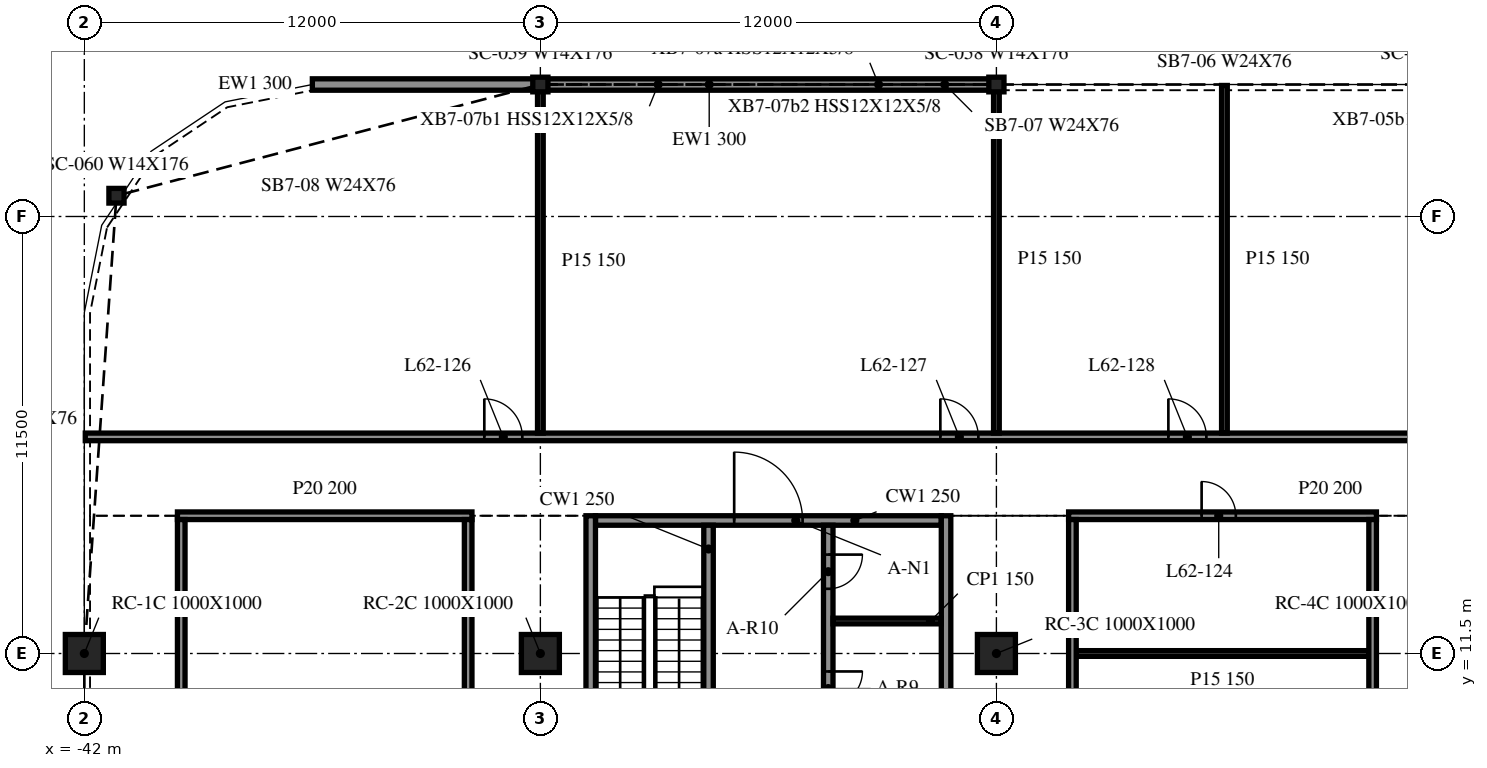
"""IFC4 building model, lengths in metres.
Left out: names, types, materials, properties, quantities, classifications, styles, units other than length and angle.
Written with IfcOpenShell. Run it as: python <this file> out.ifc"""

import sys

from ifc_helpers import new_model, si_unit, direction, frame, frame_2d, origin, origin_2d, place, context, subcontext, project, spatial, rectangle, i_section, extrude, element, fill, save


model = new_model("IFC4")
c1 = context("Model", 3, precision=1e-05, world=origin(), true_north=direction((0.0, 1.0)))
c2 = subcontext(c1, "Body", "Model", "MODEL_VIEW")
j1 = project(units=[si_unit("LENGTHUNIT", "METRE"), si_unit("PLANEANGLEUNIT", "RADIAN")], contexts=[c1])
p1 = place(None, origin())
s1 = spatial("IfcSite", under=j1, at=p1, CompositionType="ELEMENT")
p2 = place(p1, origin())
s2 = spatial("IfcBuilding", under=s1, at=p2, CompositionType="ELEMENT")
p3 = place(p2, frame((0.0, 0.0, 255.2)))
s3 = spatial("IfcBuildingStorey", under=s2, at=p3, CompositionType="ELEMENT", Elevation=255.2)
for number, where, z_axis, x_axis in (
    (1, (-42.0, 11.5, -0.34), (0.0, 0.0, 1.0), (1.0, 0.0, 0.0)),
    (2, (-30.0, 11.5, -0.34), (0.0, 0.0, 1.0), (1.0, 0.0, 0.0)),
    (3, (-18.0, 11.5, -0.34), (0.0, 0.0, 1.0), (1.0, 0.0, 0.0)),
):
    element("IfcColumn", number, at=place(p3, frame(where, z_axis=z_axis, x_axis=x_axis)), inside=s3, PredefinedType="COLUMN", context=c2, shape_type="SweptSolid", body=[
        extrude(rectangle(XDim=1.0, YDim=1.0, at=origin_2d()), origin(), (0.0, 0.0, 1.0), 3.74),
    ])
for number, where, z_axis, x_axis in (
    (4, (-18.0, 26.473, -0.34), (0.0, 0.0, 1.0), (1.0, 0.0, 0.0)),
    (5, (-30.0, 26.473, -0.34), (0.0, 0.0, 1.0), (1.0, 0.0, 0.0)),
    (6, (-41.154, 23.546, -0.34), (0.0, 0.0, 1.0), (1.0, 0.0, 0.0)),
):
    element("IfcColumn", number, at=place(p3, frame(where, z_axis=z_axis, x_axis=x_axis)), inside=s3, PredefinedType="COLUMN", context=c2, shape_type="SweptSolid", body=[
        extrude(i_section(OverallWidth=0.399, OverallDepth=0.386, WebThickness=0.021, FlangeThickness=0.033, at=origin_2d()), origin(), (0.0, 0.0, 1.0), 3.74),
    ])
p4 = place(p3, frame((-18.01, 26.473, 0.0), z_axis=(0.0, 0.0, 1.0), x_axis=(-1.0, 0.0, 0.0)))
e7 = element("IfcWall", 7, at=p4, inside=s3, PredefinedType="NOTDEFINED", context=c2, shape_type="SweptSolid", body=[
    extrude(rectangle(XDim=11.979, YDim=0.3, at=frame_2d((5.99, 0.0))), origin(), (0.0, 0.0, 1.0), 3.4),
])
p5 = place(p3, frame((-30.01, 26.473, 0.0), z_axis=(0.0, 0.0, 1.0), x_axis=(-1.0, 0.0, 0.0)))
e8 = element("IfcWall", 8, at=p5, inside=s3, PredefinedType="NOTDEFINED", context=c2, shape_type="SweptSolid", body=[
    extrude(rectangle(XDim=5.99, YDim=0.3, at=frame_2d((2.995, 0.0))), origin(), (0.0, 0.0, 1.0), 3.4),
])
for number, where, z_axis, x_axis in (
    (9, (-28.675, 15.125, 0.0), (0.0, 0.0, 1.0), (0.0, -1.0, 0.0)),
    (10, (-19.325, -9.125, 0.0), (0.0, 0.0, 1.0), (0.0, 1.0, 0.0)),
):
    element("IfcWall", number, at=place(p3, frame(where, z_axis=z_axis, x_axis=x_axis)), inside=s3, PredefinedType="SOLIDWALL", context=c2, shape_type="SweptSolid", body=[
        extrude(rectangle(XDim=24.25, YDim=0.25, at=frame_2d((12.125, 0.0))), origin(), (0.0, 0.0, 1.0), 3.4),
    ])
p6 = place(p3, frame((-28.55, 15.0, 0.0), z_axis=(0.0, 0.0, 1.0), x_axis=(1.0, 0.0, 0.0)))
e11 = element("IfcWall", 11, at=p6, inside=s3, PredefinedType="SOLIDWALL", context=c2, shape_type="SweptSolid", body=[
    extrude(rectangle(XDim=9.1, YDim=0.25, at=frame_2d((4.55, 0.0))), origin(), (0.0, 0.0, 1.0), 3.4),
])
p7 = place(p6, frame((3.65, 0.0, 0.0)))
e12 = element("IfcOpeningElement", 12, at=p7, cuts=e11, PredefinedType="OPENING", context=c2, shape_type="SweptSolid", body=[
    extrude(rectangle(XDim=1.8, YDim=2.1, at=frame_2d((0.9, 1.05))), frame((0.0, 0.135, 0.0), z_axis=(0.0, -1.0, 0.0), x_axis=(1.0, 0.0, 0.0)), (0.0, 0.0, 1.0), 0.27),
])
p8 = place(p3, frame((-25.575, 14.875, 0.0), z_axis=(0.0, 0.0, 1.0), x_axis=(0.0, -1.0, 0.0)))
e13 = element("IfcWall", 13, at=p8, inside=s3, PredefinedType="SOLIDWALL", context=c2, shape_type="SweptSolid", body=[
    extrude(rectangle(XDim=6.25, YDim=0.25, at=frame_2d((3.125, 0.0))), origin(), (0.0, 0.0, 1.0), 3.4),
])
p9 = place(p8, frame((4.85, 0.0, 0.0)))
e14 = element("IfcOpeningElement", 14, at=p9, cuts=e13, PredefinedType="OPENING", context=c2, shape_type="SweptSolid", body=[
    extrude(rectangle(XDim=1.0, YDim=2.1, at=frame_2d((0.5, 1.05))), frame((0.0, 0.135, 0.0), z_axis=(0.0, -1.0, 0.0), x_axis=(1.0, 0.0, 0.0)), (0.0, 0.0, 1.0), 0.27),
])
p10 = place(p3, frame((-22.425, 14.875, 0.0), z_axis=(0.0, 0.0, 1.0), x_axis=(0.0, -1.0, 0.0)))
e15 = element("IfcWall", 15, at=p10, inside=s3, PredefinedType="SOLIDWALL", context=c2, shape_type="SweptSolid", body=[
    extrude(rectangle(XDim=23.75, YDim=0.25, at=frame_2d((11.875, 0.0))), origin(), (0.0, 0.0, 1.0), 3.4),
])
p11 = place(p10, frame((15.225, 0.0, 0.0)))
e16 = element("IfcOpeningElement", 16, at=p11, cuts=e15, PredefinedType="OPENING", context=c2, shape_type="SweptSolid", body=[
    extrude(rectangle(XDim=0.9, YDim=2.1, at=frame_2d((0.45, 1.05))), frame((0.0, 0.135, 0.0), z_axis=(0.0, -1.0, 0.0), x_axis=(1.0, 0.0, 0.0)), (0.0, 0.0, 1.0), 0.27),
])
p12 = place(p10, frame((11.425, 0.0, 0.0)))
e17 = element("IfcOpeningElement", 17, at=p12, cuts=e15, PredefinedType="OPENING", context=c2, shape_type="SweptSolid", body=[
    extrude(rectangle(XDim=0.9, YDim=2.1, at=frame_2d((0.45, 1.05))), frame((0.0, 0.135, 0.0), z_axis=(0.0, -1.0, 0.0), x_axis=(1.0, 0.0, 0.0)), (0.0, 0.0, 1.0), 0.27),
])
p13 = place(p10, frame((7.625, 0.0, 0.0)))
e18 = element("IfcOpeningElement", 18, at=p13, cuts=e15, PredefinedType="OPENING", context=c2, shape_type="SweptSolid", body=[
    extrude(rectangle(XDim=0.9, YDim=2.1, at=frame_2d((0.45, 1.05))), frame((0.0, 0.135, 0.0), z_axis=(0.0, -1.0, 0.0), x_axis=(1.0, 0.0, 0.0)), (0.0, 0.0, 1.0), 0.27),
])
p14 = place(p10, frame((20.3, 0.0, 0.0)))
e19 = element("IfcOpeningElement", 19, at=p14, cuts=e15, PredefinedType="OPENING", context=c2, shape_type="SweptSolid", body=[
    extrude(rectangle(XDim=0.9, YDim=2.1, at=frame_2d((0.45, 1.05))), frame((0.0, 0.135, 0.0), z_axis=(0.0, -1.0, 0.0), x_axis=(1.0, 0.0, 0.0)), (0.0, 0.0, 1.0), 0.27),
])
p15 = place(p10, frame((3.847, 0.0, 0.0)))
e20 = element("IfcOpeningElement", 20, at=p15, cuts=e15, PredefinedType="OPENING", context=c2, shape_type="SweptSolid", body=[
    extrude(rectangle(XDim=0.9, YDim=2.1, at=frame_2d((0.45, 1.05))), frame((0.0, 0.135, 0.0), z_axis=(0.0, -1.0, 0.0), x_axis=(1.0, 0.0, 0.0)), (0.0, 0.0, 1.0), 0.27),
])
p16 = place(p10, frame((0.772, 0.0, 0.0)))
e21 = element("IfcOpeningElement", 21, at=p16, cuts=e15, PredefinedType="OPENING", context=c2, shape_type="SweptSolid", body=[
    extrude(rectangle(XDim=0.9, YDim=2.1, at=frame_2d((0.45, 1.05))), frame((0.0, 0.135, 0.0), z_axis=(0.0, -1.0, 0.0), x_axis=(1.0, 0.0, 0.0)), (0.0, 0.0, 1.0), 0.27),
])
p17 = place(p3, frame((-22.3, 12.355, 0.0), z_axis=(0.0, 0.0, 1.0), x_axis=(1.0, 0.0, 0.0)))
e22 = element("IfcWall", 22, at=p17, inside=s3, PredefinedType="PARTITIONING", context=c2, shape_type="SweptSolid", body=[
    extrude(rectangle(XDim=2.85, YDim=0.15, at=frame_2d((1.425, 0.0))), origin(), (0.0, 0.0, 1.0), 3.4),
])
p18 = place(p3, frame((-15.9, 11.5, 0.0), z_axis=(0.0, 0.0, 1.0), x_axis=(1.0, 0.0, 0.0)))
e23 = element("IfcWall", 23, at=p18, inside=s3, PredefinedType="PARTITIONING", context=c2, shape_type="SweptSolid", body=[
    extrude(rectangle(XDim=7.7, YDim=0.15, at=frame_2d((3.85, 0.0))), origin(), (0.0, 0.0, 1.0), 3.4),
])
p19 = place(p3, frame((-39.55, 15.125, 0.0), z_axis=(0.0, 0.0, 1.0), x_axis=(1.0, 0.0, 0.0)))
e24 = element("IfcWall", 24, at=p19, inside=s3, PredefinedType="PARTITIONING", context=c2, shape_type="SweptSolid", body=[
    extrude(rectangle(XDim=7.75, YDim=0.2, at=frame_2d((3.875, 0.0))), origin(), (0.0, 0.0, 1.0), 3.4),
])
p20 = place(p3, frame((-16.1, 15.125, 0.0), z_axis=(0.0, 0.0, 1.0), x_axis=(1.0, 0.0, 0.0)))
e25 = element("IfcWall", 25, at=p20, inside=s3, PredefinedType="PARTITIONING", context=c2, shape_type="SweptSolid", body=[
    extrude(rectangle(XDim=8.1, YDim=0.2, at=frame_2d((4.05, 0.0))), origin(), (0.0, 0.0, 1.0), 3.4),
])
p21 = place(p20, frame((3.5, 0.0, 0.0)))
e26 = element("IfcOpeningElement", 26, at=p21, cuts=e25, PredefinedType="OPENING", context=c2, shape_type="SweptSolid", body=[
    extrude(rectangle(XDim=0.9, YDim=2.1, at=frame_2d((0.45, 1.05))), frame((0.0, 0.11, 0.0), z_axis=(0.0, -1.0, 0.0), x_axis=(1.0, 0.0, 0.0)), (0.0, 0.0, 1.0), 0.22),
])
p22 = place(p3, frame((-41.975, 17.2, 0.0), z_axis=(0.0, 0.0, 1.0), x_axis=(1.0, 0.0, 0.0)))
e27 = element("IfcWall", 27, at=p22, inside=s3, PredefinedType="PARTITIONING", context=c2, shape_type="SweptSolid", body=[
    extrude(rectangle(XDim=95.95, YDim=0.2, at=frame_2d((47.975, 0.0))), origin(), (0.0, 0.0, 1.0), 3.4),
])
p23 = place(p22, frame((10.5, 0.0, 0.0)))
e28 = element("IfcOpeningElement", 28, at=p23, cuts=e27, PredefinedType="OPENING", context=c2, shape_type="SweptSolid", body=[
    extrude(rectangle(XDim=1.0, YDim=2.1, at=frame_2d((0.5, 1.05))), frame((0.0, 0.11, 0.0), z_axis=(0.0, -1.0, 0.0), x_axis=(1.0, 0.0, 0.0)), (0.0, 0.0, 1.0), 0.22),
])
p24 = place(p22, frame((22.5, 0.0, 0.0)))
e29 = element("IfcOpeningElement", 29, at=p24, cuts=e27, PredefinedType="OPENING", context=c2, shape_type="SweptSolid", body=[
    extrude(rectangle(XDim=1.0, YDim=2.1, at=frame_2d((0.5, 1.05))), frame((0.0, 0.11, 0.0), z_axis=(0.0, -1.0, 0.0), x_axis=(1.0, 0.0, 0.0)), (0.0, 0.0, 1.0), 0.22),
])
p25 = place(p22, frame((28.5, 0.0, 0.0)))
e30 = element("IfcOpeningElement", 30, at=p25, cuts=e27, PredefinedType="OPENING", context=c2, shape_type="SweptSolid", body=[
    extrude(rectangle(XDim=1.0, YDim=2.1, at=frame_2d((0.5, 1.05))), frame((0.0, 0.11, 0.0), z_axis=(0.0, -1.0, 0.0), x_axis=(1.0, 0.0, 0.0)), (0.0, 0.0, 1.0), 0.22),
])
p26 = place(p22, frame((40.7, 0.0, 0.0)))
e31 = element("IfcOpeningElement", 31, at=p26, cuts=e27, PredefinedType="OPENING", context=c2, shape_type="SweptSolid", body=[
    extrude(rectangle(XDim=0.9, YDim=2.1, at=frame_2d((0.45, 1.05))), frame((0.0, 0.11, 0.0), z_axis=(0.0, -1.0, 0.0), x_axis=(1.0, 0.0, 0.0)), (0.0, 0.0, 1.0), 0.22),
])
p27 = place(p22, frame((47.3, 0.0, 0.0)))
e32 = element("IfcOpeningElement", 32, at=p27, cuts=e27, PredefinedType="OPENING", context=c2, shape_type="SweptSolid", body=[
    extrude(rectangle(XDim=1.0, YDim=2.1, at=frame_2d((0.5, 1.05))), frame((0.0, 0.11, 0.0), z_axis=(0.0, -1.0, 0.0), x_axis=(1.0, 0.0, 0.0)), (0.0, 0.0, 1.0), 0.22),
])
p28 = place(p22, frame((54.1, 0.0, 0.0)))
e33 = element("IfcOpeningElement", 33, at=p28, cuts=e27, PredefinedType="OPENING", context=c2, shape_type="SweptSolid", body=[
    extrude(rectangle(XDim=0.9, YDim=2.1, at=frame_2d((0.45, 1.05))), frame((0.0, 0.11, 0.0), z_axis=(0.0, -1.0, 0.0), x_axis=(1.0, 0.0, 0.0)), (0.0, 0.0, 1.0), 0.22),
])
p29 = place(p22, frame((60.1, 0.0, 0.0)))
e34 = element("IfcOpeningElement", 34, at=p29, cuts=e27, PredefinedType="OPENING", context=c2, shape_type="SweptSolid", body=[
    extrude(rectangle(XDim=1.0, YDim=2.1, at=frame_2d((0.5, 1.05))), frame((0.0, 0.11, 0.0), z_axis=(0.0, -1.0, 0.0), x_axis=(1.0, 0.0, 0.0)), (0.0, 0.0, 1.0), 0.22),
])
p30 = place(p22, frame((72.1, 0.0, 0.0)))
e35 = element("IfcOpeningElement", 35, at=p30, cuts=e27, PredefinedType="OPENING", context=c2, shape_type="SweptSolid", body=[
    extrude(rectangle(XDim=1.0, YDim=2.1, at=frame_2d((0.5, 1.05))), frame((0.0, 0.11, 0.0), z_axis=(0.0, -1.0, 0.0), x_axis=(1.0, 0.0, 0.0)), (0.0, 0.0, 1.0), 0.22),
])
p31 = place(p22, frame((84.1, 0.0, 0.0)))
e36 = element("IfcOpeningElement", 36, at=p31, cuts=e27, PredefinedType="OPENING", context=c2, shape_type="SweptSolid", body=[
    extrude(rectangle(XDim=1.0, YDim=2.1, at=frame_2d((0.5, 1.05))), frame((0.0, 0.11, 0.0), z_axis=(0.0, -1.0, 0.0), x_axis=(1.0, 0.0, 0.0)), (0.0, 0.0, 1.0), 0.22),
])
p32 = place(p22, frame((90.1, 0.0, 0.0)))
e37 = element("IfcOpeningElement", 37, at=p32, cuts=e27, PredefinedType="OPENING", context=c2, shape_type="SweptSolid", body=[
    extrude(rectangle(XDim=0.9, YDim=2.1, at=frame_2d((0.45, 1.05))), frame((0.0, 0.11, 0.0), z_axis=(0.0, -1.0, 0.0), x_axis=(1.0, 0.0, 0.0)), (0.0, 0.0, 1.0), 0.22),
])
p33 = place(p3, frame((-39.45, -9.025, 0.0), z_axis=(0.0, 0.0, 1.0), x_axis=(0.0, 1.0, 0.0)))
e38 = element("IfcWall", 38, at=p33, inside=s3, PredefinedType="PARTITIONING", context=c2, shape_type="SweptSolid", body=[
    extrude(rectangle(XDim=24.05, YDim=0.2, at=frame_2d((12.025, 0.0))), origin(), (0.0, 0.0, 1.0), 3.4),
])
p34 = place(p33, frame((11.5, 0.0, 0.0)))
e39 = element("IfcOpeningElement", 39, at=p34, cuts=e38, PredefinedType="OPENING", context=c2, shape_type="SweptSolid", body=[
    extrude(rectangle(XDim=1.0, YDim=2.1, at=frame_2d((0.5, 1.05))), frame((0.0, 0.11, 0.0), z_axis=(0.0, -1.0, 0.0), x_axis=(1.0, 0.0, 0.0)), (0.0, 0.0, 1.0), 0.22),
])
p35 = place(p3, frame((-31.9, -9.025, 0.0), z_axis=(0.0, 0.0, 1.0), x_axis=(0.0, 1.0, 0.0)))
e40 = element("IfcWall", 40, at=p35, inside=s3, PredefinedType="PARTITIONING", context=c2, shape_type="SweptSolid", body=[
    extrude(rectangle(XDim=24.05, YDim=0.2, at=frame_2d((12.025, 0.0))), origin(), (0.0, 0.0, 1.0), 3.4),
])
p36 = place(p3, frame((-30.0, 17.3, 0.0), z_axis=(0.0, 0.0, 1.0), x_axis=(0.0, 1.0, 0.0)))
e41 = element("IfcWall", 41, at=p36, inside=s3, PredefinedType="PARTITIONING", context=c2, shape_type="SweptSolid", body=[
    extrude(rectangle(XDim=9.023, YDim=0.15, at=frame_2d((4.511, 0.0))), origin(), (0.0, 0.0, 1.0), 2.401),
])
p37 = place(p3, frame((-18.0, 17.3, 0.0), z_axis=(0.0, 0.0, 1.0), x_axis=(0.0, 1.0, 0.0)))
e42 = element("IfcWall", 42, at=p37, inside=s3, PredefinedType="PARTITIONING", context=c2, shape_type="SweptSolid", body=[
    extrude(rectangle(XDim=9.148, YDim=0.15, at=frame_2d((4.574, 0.0))), origin(), (0.0, 0.0, 1.0), 2.401),
])
p38 = place(p3, frame((-16.0, -9.025, 0.0), z_axis=(0.0, 0.0, 1.0), x_axis=(0.0, 1.0, 0.0)))
e43 = element("IfcWall", 43, at=p38, inside=s3, PredefinedType="PARTITIONING", context=c2, shape_type="SweptSolid", body=[
    extrude(rectangle(XDim=24.05, YDim=0.2, at=frame_2d((12.025, 0.0))), origin(), (0.0, 0.0, 1.0), 3.4),
])
p39 = place(p38, frame((11.5, 0.0, 0.0)))
e44 = element("IfcOpeningElement", 44, at=p39, cuts=e43, PredefinedType="OPENING", context=c2, shape_type="SweptSolid", body=[
    extrude(rectangle(XDim=0.9, YDim=2.1, at=frame_2d((0.45, 1.05))), frame((0.0, 0.11, 0.0), z_axis=(0.0, -1.0, 0.0), x_axis=(1.0, 0.0, 0.0)), (0.0, 0.0, 1.0), 0.22),
])
p40 = place(p3, frame((-12.0, 17.3, 0.0), z_axis=(0.0, 0.0, 1.0), x_axis=(0.0, 1.0, 0.0)))
e45 = element("IfcWall", 45, at=p40, inside=s3, PredefinedType="PARTITIONING", context=c2, shape_type="SweptSolid", body=[
    extrude(rectangle(XDim=9.148, YDim=0.15, at=frame_2d((4.574, 0.0))), origin(), (0.0, 0.0, 1.0), 3.4),
])
p41 = place(p3, frame((-8.1, -9.025, 0.0), z_axis=(0.0, 0.0, 1.0), x_axis=(0.0, 1.0, 0.0)))
e46 = element("IfcWall", 46, at=p41, inside=s3, PredefinedType="PARTITIONING", context=c2, shape_type="SweptSolid", body=[
    extrude(rectangle(XDim=24.05, YDim=0.2, at=frame_2d((12.025, 0.0))), origin(), (0.0, 0.0, 1.0), 3.4),
])
p42 = place(p7, origin())
e47 = element("IfcDoor", 47, at=p42, inside=s3, OperationType="DOUBLE_DOOR_SINGLE_SWING", PredefinedType="DOOR", context=c2, shape_type="SweptSolid", body=[
    extrude(rectangle(XDim=1.8, YDim=2.1, at=frame_2d((0.9, 1.05))), frame((0.0, 0.025, 0.0), z_axis=(0.0, -1.0, 0.0), x_axis=(1.0, 0.0, 0.0)), (0.0, 0.0, 1.0), 0.05),
])
fill(e12, e47)
p43 = place(p15, origin())
e48 = element("IfcDoor", 48, at=p43, inside=s3, OperationType="SINGLE_SWING_LEFT", PredefinedType="DOOR", context=c2, shape_type="SweptSolid", body=[
    extrude(rectangle(XDim=0.9, YDim=2.1, at=frame_2d((0.45, 1.05))), frame((0.0, 0.025, 0.0), z_axis=(0.0, -1.0, 0.0), x_axis=(1.0, 0.0, 0.0)), (0.0, 0.0, 1.0), 0.05),
])
fill(e20, e48)
p44 = place(p16, origin())
e49 = element("IfcDoor", 49, at=p44, inside=s3, OperationType="SINGLE_SWING_RIGHT", PredefinedType="DOOR", context=c2, shape_type="SweptSolid", body=[
    extrude(rectangle(XDim=0.9, YDim=2.1, at=frame_2d((0.45, 1.05))), frame((0.0, 0.025, 0.0), z_axis=(0.0, -1.0, 0.0), x_axis=(1.0, 0.0, 0.0)), (0.0, 0.0, 1.0), 0.05),
])
fill(e21, e49)
p45 = place(p21, origin())
e50 = element("IfcDoor", 50, at=p45, inside=s3, OperationType="SINGLE_SWING_RIGHT", PredefinedType="DOOR", context=c2, shape_type="SweptSolid", body=[
    extrude(rectangle(XDim=0.9, YDim=2.1, at=frame_2d((0.45, 1.05))), frame((0.0, 0.025, 0.0), z_axis=(0.0, -1.0, 0.0), x_axis=(1.0, 0.0, 0.0)), (0.0, 0.0, 1.0), 0.05),
])
fill(e26, e50)
p46 = place(p23, origin())
e51 = element("IfcDoor", 51, at=p46, inside=s3, OperationType="SINGLE_SWING_LEFT", PredefinedType="DOOR", context=c2, shape_type="SweptSolid", body=[
    extrude(rectangle(XDim=1.0, YDim=2.1, at=frame_2d((0.5, 1.05))), frame((0.0, 0.025, 0.0), z_axis=(0.0, -1.0, 0.0), x_axis=(1.0, 0.0, 0.0)), (0.0, 0.0, 1.0), 0.05),
])
fill(e28, e51)
p47 = place(p24, origin())
e52 = element("IfcDoor", 52, at=p47, inside=s3, OperationType="SINGLE_SWING_LEFT", PredefinedType="DOOR", context=c2, shape_type="SweptSolid", body=[
    extrude(rectangle(XDim=1.0, YDim=2.1, at=frame_2d((0.5, 1.05))), frame((0.0, 0.025, 0.0), z_axis=(0.0, -1.0, 0.0), x_axis=(1.0, 0.0, 0.0)), (0.0, 0.0, 1.0), 0.05),
])
fill(e29, e52)
p48 = place(p25, origin())
e53 = element("IfcDoor", 53, at=p48, inside=s3, OperationType="SINGLE_SWING_LEFT", PredefinedType="DOOR", context=c2, shape_type="SweptSolid", body=[
    extrude(rectangle(XDim=1.0, YDim=2.1, at=frame_2d((0.5, 1.05))), frame((0.0, 0.025, 0.0), z_axis=(0.0, -1.0, 0.0), x_axis=(1.0, 0.0, 0.0)), (0.0, 0.0, 1.0), 0.05),
])
fill(e30, e53)
save(model, sys.argv[1])
